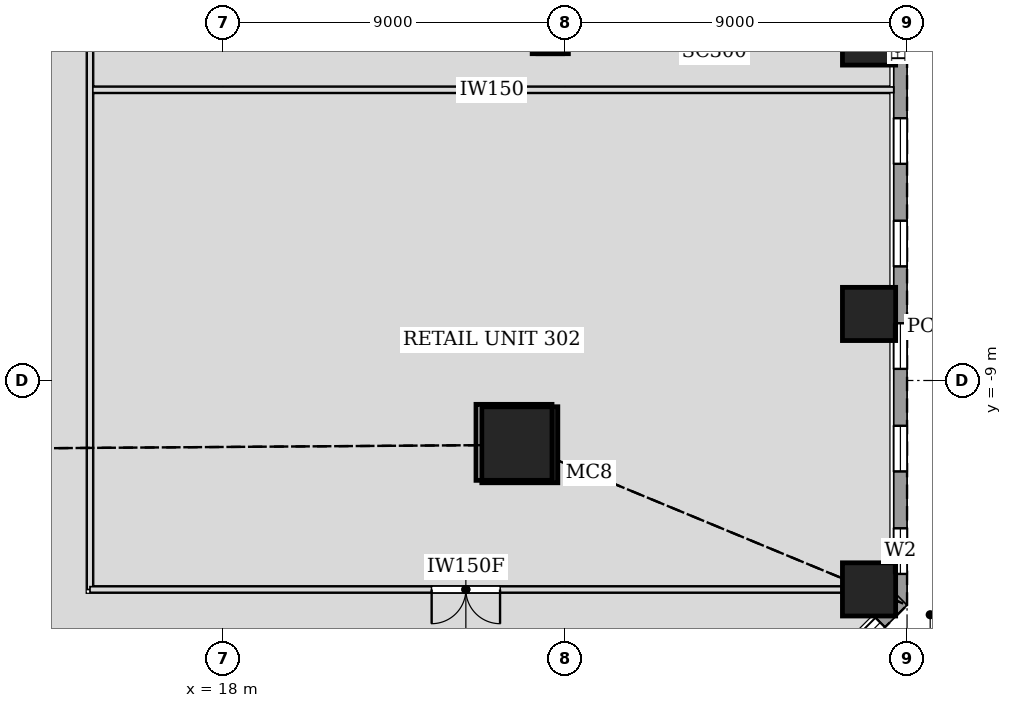
"""IFC4 building model, lengths in metres.
Left out: names, types, materials, properties, quantities, classifications, styles, units other than length and angle.
Written with IfcOpenShell. Run it as: python <this file> out.ifc"""

import sys

from ifc_helpers import new_model, si_unit, direction, frame, frame_2d, origin, origin_2d, place, context, subcontext, project, spatial, rectangle, hollow_rectangle, extrude, element, fill, save


model = new_model("IFC4")
c1 = context("Model", 3, precision=1e-05, world=origin(), true_north=direction((0.0, 1.0)))
c2 = subcontext(c1, "Body", "Model", "MODEL_VIEW")
j1 = project(units=[si_unit("LENGTHUNIT", "METRE"), si_unit("PLANEANGLEUNIT", "RADIAN")], contexts=[c1])
p1 = place(None, origin())
s1 = spatial("IfcSite", under=j1, at=p1, CompositionType="ELEMENT")
p2 = place(p1, origin())
s2 = spatial("IfcBuilding", under=s1, at=p2, CompositionType="ELEMENT")
p3 = place(p2, frame((0.0, 0.0, 18.6)))
s3 = spatial("IfcBuildingStorey", under=s2, at=p3, CompositionType="ELEMENT", Elevation=18.6)
p4 = place(p3, frame((25.81, -10.691, 0.0), z_axis=(-0.028289472832, 0.011704430453, 0.999531246152), x_axis=(-0.3823083337, -0.92403481427, 0.0)))
e1 = element("IfcColumn", 1, at=p4, inside=s3, PredefinedType="COLUMN", context=c2, shape_type="SweptSolid", body=[
    extrude(hollow_rectangle(XDim=2.0, YDim=2.0, WallThickness=0.09, at=origin_2d()), origin(), (0.0, 0.0, 1.0), 5.402),
])
p5 = place(p3, frame((26.688, 0.0, 0.0), z_axis=(-0.02824625291, 0.0, 0.999600994996), x_axis=(0.0, -1.0, 0.0)))
e2 = element("IfcColumn", 2, at=p5, inside=s3, PredefinedType="COLUMN", context=c2, shape_type="SweptSolid", body=[
    extrude(hollow_rectangle(XDim=0.8, YDim=0.8, WallThickness=0.05, at=origin_2d()), origin(), (0.0, 0.0, 1.0), 5.402),
])
for number, where, z_axis, x_axis in (
    (3, (35.0, -14.498, 0.0), (0.0, 0.0, 1.0), (1.0, 0.0, 0.0)),
    (4, (35.0, -7.249, 0.0), (0.0, 0.0, 1.0), (1.0, 0.0, 0.0)),
    (5, (35.0, 0.0, 0.0), (0.0, 0.0, 1.0), (1.0, 0.0, 0.0)),
):
    element("IfcColumn", number, at=place(p3, frame(where, z_axis=z_axis, x_axis=x_axis)), inside=s3, PredefinedType="COLUMN", context=c2, shape_type="SweptSolid", body=[
        extrude(rectangle(XDim=1.4, YDim=1.4, at=origin_2d()), origin(), (0.0, 0.0, 1.0), 5.4),
    ])
p6 = place(p3, frame((35.825, -14.912, 0.0), z_axis=(0.0, 0.0, 1.0), x_axis=(0.0, 1.0, 0.0)))
e6 = element("IfcWall", 6, at=p6, inside=s3, PredefinedType="SOLIDWALL", context=c2, shape_type="SweptSolid", body=[
    extrude(rectangle(XDim=29.823, YDim=0.35, at=frame_2d((14.912, 0.0))), origin(), (0.0, 0.0, 1.0), 5.1),
])
p7 = place(p6, frame((0.822, 0.0, 0.9)))
e7 = element("IfcOpeningElement", 7, at=p7, cuts=e6, PredefinedType="OPENING", context=c2, shape_type="SweptSolid", body=[
    extrude(rectangle(XDim=1.2, YDim=3.6, at=frame_2d((0.6, 1.8))), frame((0.0, 0.185, 0.0), z_axis=(0.0, -1.0, 0.0), x_axis=(1.0, 0.0, 0.0)), (0.0, 0.0, 1.0), 0.37),
])
p8 = place(p6, frame((3.52, 0.0, 0.9)))
e8 = element("IfcOpeningElement", 8, at=p8, cuts=e6, PredefinedType="OPENING", context=c2, shape_type="SweptSolid", body=[
    extrude(rectangle(XDim=1.2, YDim=3.6, at=frame_2d((0.6, 1.8))), frame((0.0, 0.185, 0.0), z_axis=(0.0, -1.0, 0.0), x_axis=(1.0, 0.0, 0.0)), (0.0, 0.0, 1.0), 0.37),
])
p9 = place(p6, frame((6.218, 0.0, 0.9)))
e9 = element("IfcOpeningElement", 9, at=p9, cuts=e6, PredefinedType="OPENING", context=c2, shape_type="SweptSolid", body=[
    extrude(rectangle(XDim=1.2, YDim=3.6, at=frame_2d((0.6, 1.8))), frame((0.0, 0.185, 0.0), z_axis=(0.0, -1.0, 0.0), x_axis=(1.0, 0.0, 0.0)), (0.0, 0.0, 1.0), 0.37),
])
p10 = place(p6, frame((8.916, 0.0, 0.9)))
e10 = element("IfcOpeningElement", 10, at=p10, cuts=e6, PredefinedType="OPENING", context=c2, shape_type="SweptSolid", body=[
    extrude(rectangle(XDim=1.2, YDim=3.6, at=frame_2d((0.6, 1.8))), frame((0.0, 0.185, 0.0), z_axis=(0.0, -1.0, 0.0), x_axis=(1.0, 0.0, 0.0)), (0.0, 0.0, 1.0), 0.37),
])
p11 = place(p6, frame((11.614, 0.0, 0.9)))
e11 = element("IfcOpeningElement", 11, at=p11, cuts=e6, PredefinedType="OPENING", context=c2, shape_type="SweptSolid", body=[
    extrude(rectangle(XDim=1.2, YDim=3.6, at=frame_2d((0.6, 1.8))), frame((0.0, 0.185, 0.0), z_axis=(0.0, -1.0, 0.0), x_axis=(1.0, 0.0, 0.0)), (0.0, 0.0, 1.0), 0.37),
])
p12 = place(p6, frame((14.312, 0.0, 0.9)))
e12 = element("IfcOpeningElement", 12, at=p12, cuts=e6, PredefinedType="OPENING", context=c2, shape_type="SweptSolid", body=[
    extrude(rectangle(XDim=1.2, YDim=3.6, at=frame_2d((0.6, 1.8))), frame((0.0, 0.185, 0.0), z_axis=(0.0, -1.0, 0.0), x_axis=(1.0, 0.0, 0.0)), (0.0, 0.0, 1.0), 0.37),
])
p13 = place(p6, frame((17.01, 0.0, 0.9)))
e13 = element("IfcOpeningElement", 13, at=p13, cuts=e6, PredefinedType="OPENING", context=c2, shape_type="SweptSolid", body=[
    extrude(rectangle(XDim=1.2, YDim=3.6, at=frame_2d((0.6, 1.8))), frame((0.0, 0.185, 0.0), z_axis=(0.0, -1.0, 0.0), x_axis=(1.0, 0.0, 0.0)), (0.0, 0.0, 1.0), 0.37),
])
p14 = place(p6, frame((19.708, 0.0, 0.9)))
e14 = element("IfcOpeningElement", 14, at=p14, cuts=e6, PredefinedType="OPENING", context=c2, shape_type="SweptSolid", body=[
    extrude(rectangle(XDim=1.2, YDim=3.6, at=frame_2d((0.6, 1.8))), frame((0.0, 0.185, 0.0), z_axis=(0.0, -1.0, 0.0), x_axis=(1.0, 0.0, 0.0)), (0.0, 0.0, 1.0), 0.37),
])
p15 = place(p6, frame((22.406, 0.0, 0.9)))
e15 = element("IfcOpeningElement", 15, at=p15, cuts=e6, PredefinedType="OPENING", context=c2, shape_type="SweptSolid", body=[
    extrude(rectangle(XDim=1.2, YDim=3.6, at=frame_2d((0.6, 1.8))), frame((0.0, 0.185, 0.0), z_axis=(0.0, -1.0, 0.0), x_axis=(1.0, 0.0, 0.0)), (0.0, 0.0, 1.0), 0.37),
])
p16 = place(p6, frame((25.104, 0.0, 0.9)))
e16 = element("IfcOpeningElement", 16, at=p16, cuts=e6, PredefinedType="OPENING", context=c2, shape_type="SweptSolid", body=[
    extrude(rectangle(XDim=1.2, YDim=3.6, at=frame_2d((0.6, 1.8))), frame((0.0, 0.185, 0.0), z_axis=(0.0, -1.0, 0.0), x_axis=(1.0, 0.0, 0.0)), (0.0, 0.0, 1.0), 0.37),
])
p17 = place(p6, frame((27.802, 0.0, 0.9)))
e17 = element("IfcOpeningElement", 17, at=p17, cuts=e6, PredefinedType="OPENING", context=c2, shape_type="SweptSolid", body=[
    extrude(rectangle(XDim=1.2, YDim=3.6, at=frame_2d((0.6, 1.8))), frame((0.0, 0.185, 0.0), z_axis=(0.0, -1.0, 0.0), x_axis=(1.0, 0.0, 0.0)), (0.0, 0.0, 1.0), 0.37),
])
p18 = place(p3, frame((14.788, -35.876, 0.0), z_axis=(0.0, 0.0, 1.0), x_axis=(0.707106781187, 0.707106781187, 0.0)))
e18 = element("IfcWall", 18, at=p18, inside=s3, PredefinedType="SOLIDWALL", context=c2, shape_type="SweptSolid", body=[
    extrude(rectangle(XDim=29.823, YDim=0.35, at=frame_2d((14.912, 0.0))), origin(), (0.0, 0.0, 1.0), 5.1),
])
p19 = place(p18, frame((0.822, 0.0, 0.9)))
e19 = element("IfcOpeningElement", 19, at=p19, cuts=e18, PredefinedType="OPENING", context=c2, shape_type="SweptSolid", body=[
    extrude(rectangle(XDim=1.2, YDim=3.6, at=frame_2d((0.6, 1.8))), frame((0.0, 0.185, 0.0), z_axis=(0.0, -1.0, 0.0), x_axis=(1.0, 0.0, 0.0)), (0.0, 0.0, 1.0), 0.37),
])
p20 = place(p18, frame((3.52, 0.0, 0.9)))
e20 = element("IfcOpeningElement", 20, at=p20, cuts=e18, PredefinedType="OPENING", context=c2, shape_type="SweptSolid", body=[
    extrude(rectangle(XDim=1.2, YDim=3.6, at=frame_2d((0.6, 1.8))), frame((0.0, 0.185, 0.0), z_axis=(0.0, -1.0, 0.0), x_axis=(1.0, 0.0, 0.0)), (0.0, 0.0, 1.0), 0.37),
])
p21 = place(p18, frame((6.218, 0.0, 0.9)))
e21 = element("IfcOpeningElement", 21, at=p21, cuts=e18, PredefinedType="OPENING", context=c2, shape_type="SweptSolid", body=[
    extrude(rectangle(XDim=1.2, YDim=3.6, at=frame_2d((0.6, 1.8))), frame((0.0, 0.185, 0.0), z_axis=(0.0, -1.0, 0.0), x_axis=(1.0, 0.0, 0.0)), (0.0, 0.0, 1.0), 0.37),
])
p22 = place(p18, frame((8.916, 0.0, 0.9)))
e22 = element("IfcOpeningElement", 22, at=p22, cuts=e18, PredefinedType="OPENING", context=c2, shape_type="SweptSolid", body=[
    extrude(rectangle(XDim=1.2, YDim=3.6, at=frame_2d((0.6, 1.8))), frame((0.0, 0.185, 0.0), z_axis=(0.0, -1.0, 0.0), x_axis=(1.0, 0.0, 0.0)), (0.0, 0.0, 1.0), 0.37),
])
p23 = place(p18, frame((11.614, 0.0, 0.9)))
e23 = element("IfcOpeningElement", 23, at=p23, cuts=e18, PredefinedType="OPENING", context=c2, shape_type="SweptSolid", body=[
    extrude(rectangle(XDim=1.2, YDim=3.6, at=frame_2d((0.6, 1.8))), frame((0.0, 0.185, 0.0), z_axis=(0.0, -1.0, 0.0), x_axis=(1.0, 0.0, 0.0)), (0.0, 0.0, 1.0), 0.37),
])
p24 = place(p18, frame((14.312, 0.0, 0.9)))
e24 = element("IfcOpeningElement", 24, at=p24, cuts=e18, PredefinedType="OPENING", context=c2, shape_type="SweptSolid", body=[
    extrude(rectangle(XDim=1.2, YDim=3.6, at=frame_2d((0.6, 1.8))), frame((0.0, 0.185, 0.0), z_axis=(0.0, -1.0, 0.0), x_axis=(1.0, 0.0, 0.0)), (0.0, 0.0, 1.0), 0.37),
])
p25 = place(p18, frame((17.01, 0.0, 0.9)))
e25 = element("IfcOpeningElement", 25, at=p25, cuts=e18, PredefinedType="OPENING", context=c2, shape_type="SweptSolid", body=[
    extrude(rectangle(XDim=1.2, YDim=3.6, at=frame_2d((0.6, 1.8))), frame((0.0, 0.185, 0.0), z_axis=(0.0, -1.0, 0.0), x_axis=(1.0, 0.0, 0.0)), (0.0, 0.0, 1.0), 0.37),
])
p26 = place(p18, frame((19.708, 0.0, 0.9)))
e26 = element("IfcOpeningElement", 26, at=p26, cuts=e18, PredefinedType="OPENING", context=c2, shape_type="SweptSolid", body=[
    extrude(rectangle(XDim=1.2, YDim=3.6, at=frame_2d((0.6, 1.8))), frame((0.0, 0.185, 0.0), z_axis=(0.0, -1.0, 0.0), x_axis=(1.0, 0.0, 0.0)), (0.0, 0.0, 1.0), 0.37),
])
p27 = place(p18, frame((22.406, 0.0, 0.9)))
e27 = element("IfcOpeningElement", 27, at=p27, cuts=e18, PredefinedType="OPENING", context=c2, shape_type="SweptSolid", body=[
    extrude(rectangle(XDim=1.2, YDim=3.6, at=frame_2d((0.6, 1.8))), frame((0.0, 0.185, 0.0), z_axis=(0.0, -1.0, 0.0), x_axis=(1.0, 0.0, 0.0)), (0.0, 0.0, 1.0), 0.37),
])
p28 = place(p18, frame((25.104, 0.0, 0.9)))
e28 = element("IfcOpeningElement", 28, at=p28, cuts=e18, PredefinedType="OPENING", context=c2, shape_type="SweptSolid", body=[
    extrude(rectangle(XDim=1.2, YDim=3.6, at=frame_2d((0.6, 1.8))), frame((0.0, 0.185, 0.0), z_axis=(0.0, -1.0, 0.0), x_axis=(1.0, 0.0, 0.0)), (0.0, 0.0, 1.0), 0.37),
])
p29 = place(p18, frame((27.802, 0.0, 0.9)))
e29 = element("IfcOpeningElement", 29, at=p29, cuts=e18, PredefinedType="OPENING", context=c2, shape_type="SweptSolid", body=[
    extrude(rectangle(XDim=1.2, YDim=3.6, at=frame_2d((0.6, 1.8))), frame((0.0, 0.185, 0.0), z_axis=(0.0, -1.0, 0.0), x_axis=(1.0, 0.0, 0.0)), (0.0, 0.0, 1.0), 0.37),
])
p30 = place(p3, frame((14.5, -1.35, 0.0), z_axis=(0.0, 0.0, 1.0), x_axis=(1.0, 0.0, 0.0)))
e30 = element("IfcWall", 30, at=p30, inside=s3, PredefinedType="PARTITIONING", context=c2, shape_type="SweptSolid", body=[
    extrude(rectangle(XDim=21.15, YDim=0.15, at=frame_2d((10.575, 0.0))), origin(), (0.0, 0.0, 1.0), 4.163),
])
p31 = place(p3, frame((14.5, 14.5, 0.0), z_axis=(0.0, 0.0, 1.0), x_axis=(0.0, -1.0, 0.0)))
e31 = element("IfcWall", 31, at=p31, inside=s3, PredefinedType="PARTITIONING", context=c2, shape_type="SweptSolid", body=[
    extrude(rectangle(XDim=29.0, YDim=0.15, at=frame_2d((14.5, 0.0))), origin(), (0.0, 0.0, 1.0), 3.79),
])
p32 = place(p31, frame((7.025, 0.0, 0.0)))
e32 = element("IfcOpeningElement", 32, at=p32, cuts=e31, PredefinedType="OPENING", context=c2, shape_type="SweptSolid", body=[
    extrude(rectangle(XDim=1.8, YDim=2.4, at=frame_2d((0.9, 1.2))), frame((0.0, 0.085, 0.0), z_axis=(0.0, -1.0, 0.0), x_axis=(1.0, 0.0, 0.0)), (0.0, 0.0, 1.0), 0.17),
])
p33 = place(p3, frame((14.5, -14.5, 0.0), z_axis=(0.0, 0.0, 1.0), x_axis=(1.0, 0.0, 0.0)))
e33 = element("IfcWall", 33, at=p33, inside=s3, PredefinedType="PARTITIONING", context=c2, shape_type="SweptSolid", body=[
    extrude(rectangle(XDim=19.781, YDim=0.15, at=frame_2d((9.891, 0.0))), origin(), (0.0, 0.0, 1.0), 4.13),
])
p34 = place(p33, frame((8.99, 0.0, 0.0)))
e34 = element("IfcOpeningElement", 34, at=p34, cuts=e33, PredefinedType="OPENING", context=c2, shape_type="SweptSolid", body=[
    extrude(rectangle(XDim=1.8, YDim=2.4, at=frame_2d((0.9, 1.2))), frame((0.0, 0.085, 0.0), z_axis=(0.0, -1.0, 0.0), x_axis=(1.0, 0.0, 0.0)), (0.0, 0.0, 1.0), 0.17),
])
p35 = place(p7, origin())
e35 = element("IfcWindow", 35, at=p35, inside=s3, PartitioningType="SINGLE_PANEL", PredefinedType="WINDOW", context=c2, shape_type="SweptSolid", body=[
    extrude(rectangle(XDim=1.2, YDim=3.6, at=frame_2d((0.6, 1.8))), frame((0.0, 0.03, 0.0), z_axis=(0.0, -1.0, 0.0), x_axis=(1.0, 0.0, 0.0)), (0.0, 0.0, 1.0), 0.06),
])
fill(e7, e35)
p36 = place(p8, origin())
e36 = element("IfcWindow", 36, at=p36, inside=s3, PartitioningType="SINGLE_PANEL", PredefinedType="WINDOW", context=c2, shape_type="SweptSolid", body=[
    extrude(rectangle(XDim=1.2, YDim=3.6, at=frame_2d((0.6, 1.8))), frame((0.0, 0.03, 0.0), z_axis=(0.0, -1.0, 0.0), x_axis=(1.0, 0.0, 0.0)), (0.0, 0.0, 1.0), 0.06),
])
fill(e8, e36)
p37 = place(p9, origin())
e37 = element("IfcWindow", 37, at=p37, inside=s3, PartitioningType="SINGLE_PANEL", PredefinedType="WINDOW", context=c2, shape_type="SweptSolid", body=[
    extrude(rectangle(XDim=1.2, YDim=3.6, at=frame_2d((0.6, 1.8))), frame((0.0, 0.03, 0.0), z_axis=(0.0, -1.0, 0.0), x_axis=(1.0, 0.0, 0.0)), (0.0, 0.0, 1.0), 0.06),
])
fill(e9, e37)
p38 = place(p10, origin())
e38 = element("IfcWindow", 38, at=p38, inside=s3, PartitioningType="SINGLE_PANEL", PredefinedType="WINDOW", context=c2, shape_type="SweptSolid", body=[
    extrude(rectangle(XDim=1.2, YDim=3.6, at=frame_2d((0.6, 1.8))), frame((0.0, 0.03, 0.0), z_axis=(0.0, -1.0, 0.0), x_axis=(1.0, 0.0, 0.0)), (0.0, 0.0, 1.0), 0.06),
])
fill(e10, e38)
p39 = place(p11, origin())
e39 = element("IfcWindow", 39, at=p39, inside=s3, PartitioningType="SINGLE_PANEL", PredefinedType="WINDOW", context=c2, shape_type="SweptSolid", body=[
    extrude(rectangle(XDim=1.2, YDim=3.6, at=frame_2d((0.6, 1.8))), frame((0.0, 0.03, 0.0), z_axis=(0.0, -1.0, 0.0), x_axis=(1.0, 0.0, 0.0)), (0.0, 0.0, 1.0), 0.06),
])
fill(e11, e39)
p40 = place(p12, origin())
e40 = element("IfcWindow", 40, at=p40, inside=s3, PartitioningType="SINGLE_PANEL", PredefinedType="WINDOW", context=c2, shape_type="SweptSolid", body=[
    extrude(rectangle(XDim=1.2, YDim=3.6, at=frame_2d((0.6, 1.8))), frame((0.0, 0.03, 0.0), z_axis=(0.0, -1.0, 0.0), x_axis=(1.0, 0.0, 0.0)), (0.0, 0.0, 1.0), 0.06),
])
fill(e12, e40)
p41 = place(p29, origin())
e41 = element("IfcWindow", 41, at=p41, inside=s3, PartitioningType="SINGLE_PANEL", PredefinedType="WINDOW", context=c2, shape_type="SweptSolid", body=[
    extrude(rectangle(XDim=1.2, YDim=3.6, at=frame_2d((0.6, 1.8))), frame((0.0, 0.03, 0.0), z_axis=(0.0, -1.0, 0.0), x_axis=(1.0, 0.0, 0.0)), (0.0, 0.0, 1.0), 0.06),
])
fill(e29, e41)
p42 = place(p34, frame((1.8, 0.0, 0.0), z_axis=(0.0, 0.0, 1.0), x_axis=(-1.0, 0.0, 0.0)))
e42 = element("IfcDoor", 42, at=p42, inside=s3, OperationType="DOUBLE_DOOR_SINGLE_SWING", PredefinedType="DOOR", context=c2, shape_type="SweptSolid", body=[
    extrude(rectangle(XDim=1.8, YDim=2.4, at=frame_2d((0.9, 1.2))), frame((0.0, 0.025, 0.0), z_axis=(0.0, -1.0, 0.0), x_axis=(1.0, 0.0, 0.0)), (0.0, 0.0, 1.0), 0.05),
])
fill(e34, e42)
save(model, sys.argv[1])
